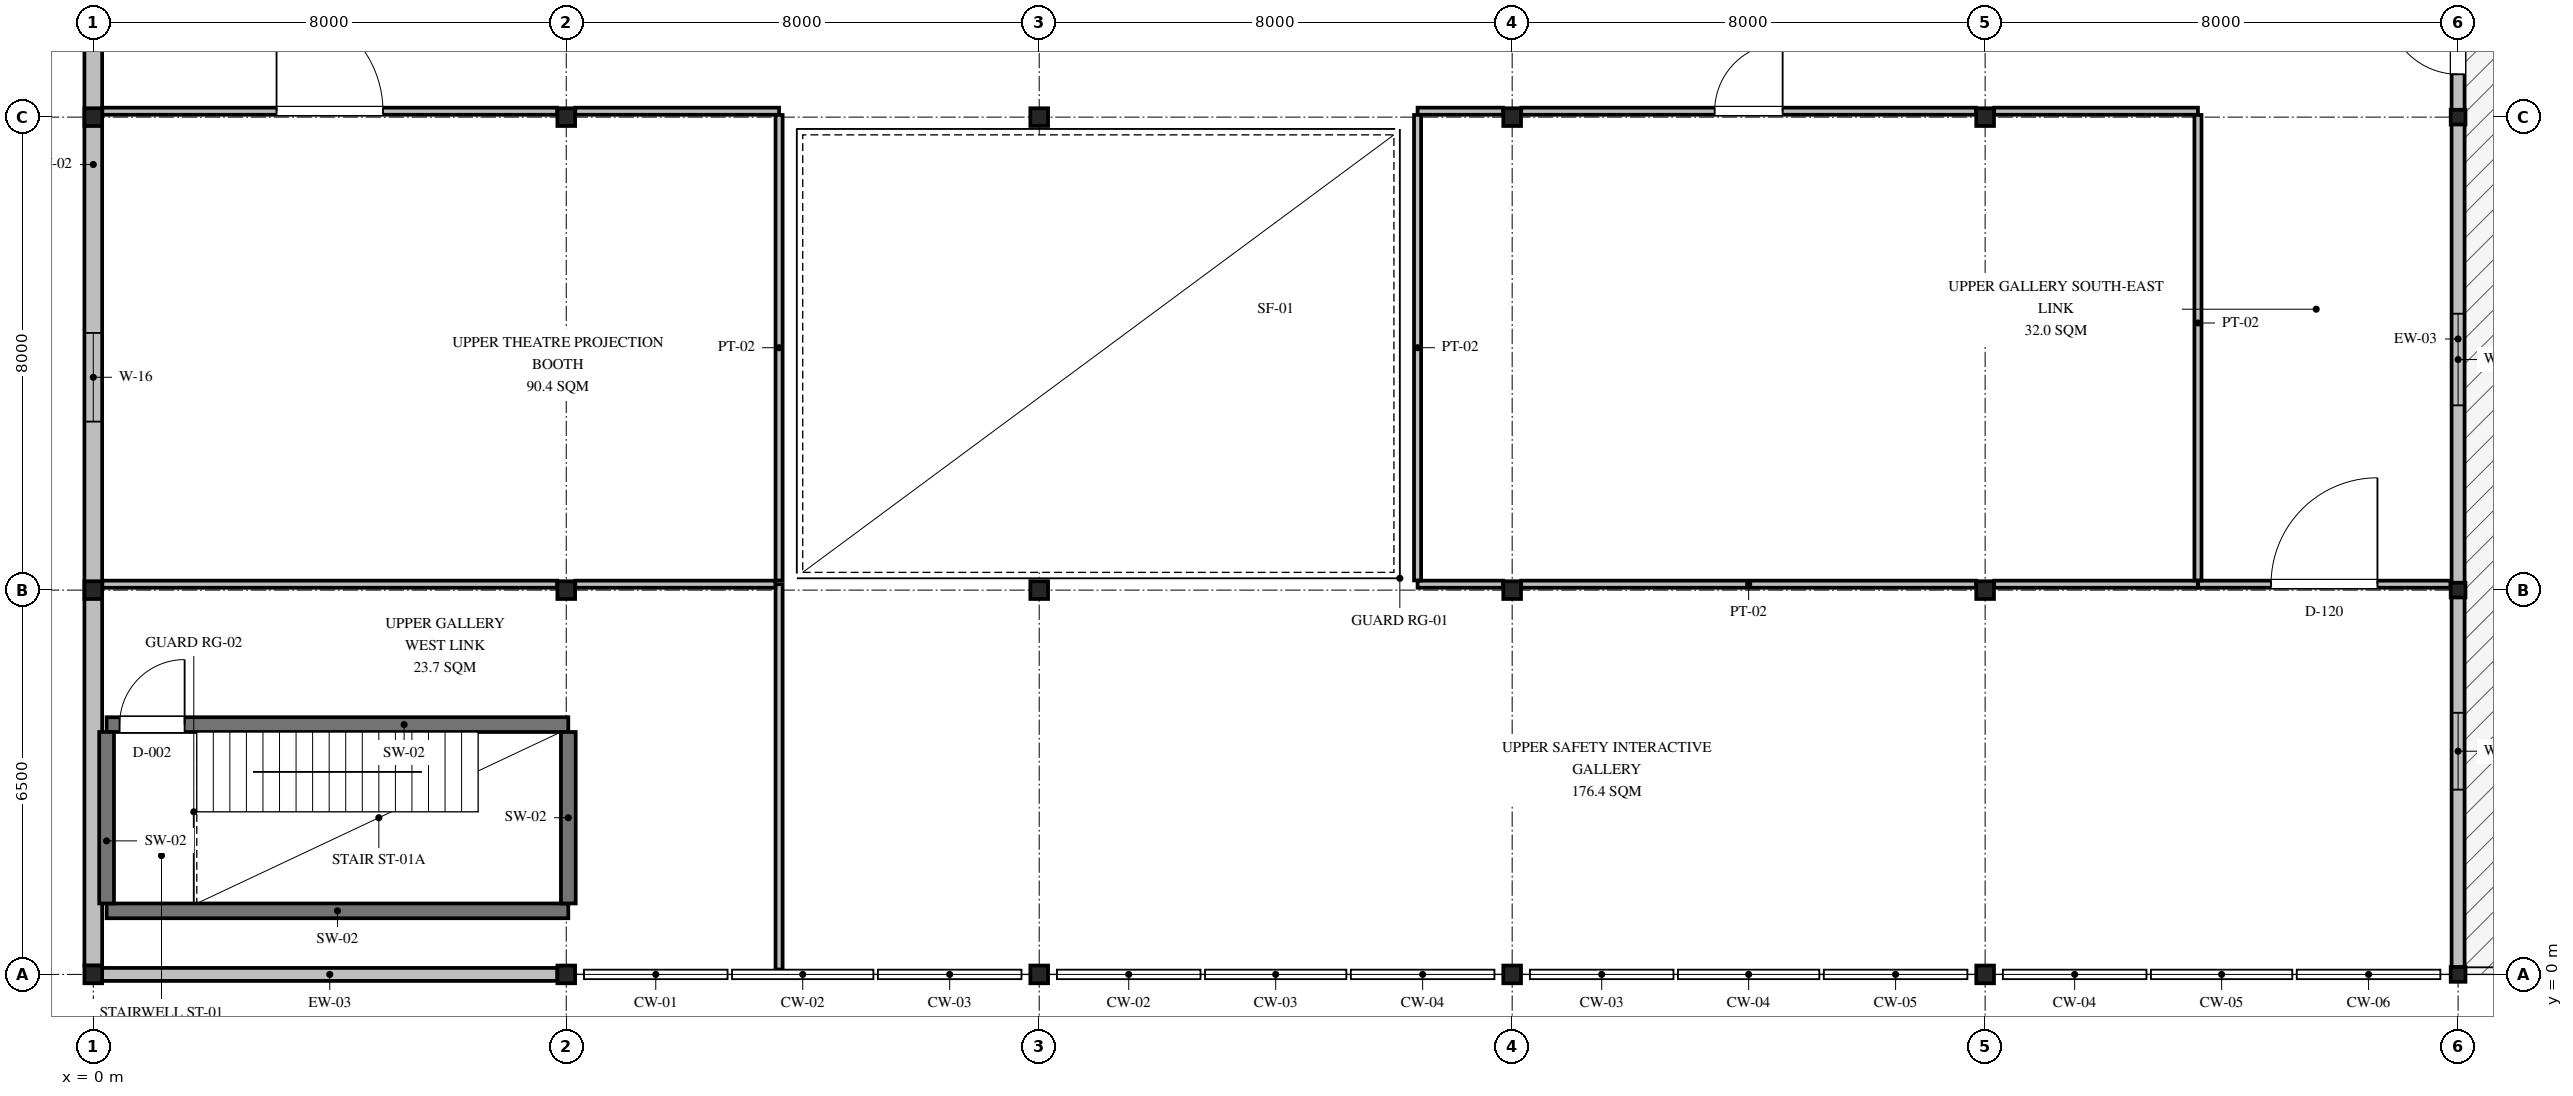
"""IFC4 building model, lengths in metres.
Left out: names, types, materials, properties, quantities, classifications, styles, units other than length and angle.
Written with IfcOpenShell. Run it as: python <this file> out.ifc"""

import sys

from ifc_helpers import new_model, si_unit, direction, frame, frame_2d, origin, origin_2d, place, context, subcontext, project, spatial, rectangle, hollow_rectangle, i_section, extrude, element, fill, save


model = new_model("IFC4")
c1 = context("Model", 3, precision=1e-05, world=origin(), true_north=direction((0.0, 1.0)))
c2 = subcontext(c1, "Body", "Model", "MODEL_VIEW")
j1 = project(units=[si_unit("LENGTHUNIT", "METRE"), si_unit("PLANEANGLEUNIT", "RADIAN")], contexts=[c1])
p1 = place(None, origin())
s1 = spatial("IfcSite", under=j1, at=p1, CompositionType="ELEMENT")
p2 = place(p1, origin())
s2 = spatial("IfcBuilding", under=s1, at=p2, CompositionType="ELEMENT")
p3 = place(p2, frame((0.0, 0.0, 5.85)))
s3 = spatial("IfcBuildingStorey", under=s2, at=p3, CompositionType="ELEMENT", Elevation=5.85)
for number, where, z_axis, x_axis in (
    (1, (0.0, 0.0, 0.0), (0.0, 0.0, 1.0), (1.0, 0.0, 0.0)),
    (2, (0.0, 6.5, 0.0), (0.0, 0.0, 1.0), (1.0, 0.0, 0.0)),
    (3, (0.0, 14.5, 0.0), (0.0, 0.0, 1.0), (1.0, 0.0, 0.0)),
    (4, (8.0, 0.0, 0.0), (0.0, 0.0, 1.0), (1.0, 0.0, 0.0)),
    (5, (8.0, 6.5, 0.0), (0.0, 0.0, 1.0), (1.0, 0.0, 0.0)),
    (6, (8.0, 14.5, 0.0), (0.0, 0.0, 1.0), (1.0, 0.0, 0.0)),
    (7, (16.0, 0.0, 0.0), (0.0, 0.0, 1.0), (1.0, 0.0, 0.0)),
    (8, (16.0, 6.5, 0.0), (0.0, 0.0, 1.0), (1.0, 0.0, 0.0)),
    (9, (16.0, 14.5, 0.0), (0.0, 0.0, 1.0), (1.0, 0.0, 0.0)),
    (10, (24.0, 0.0, 0.0), (0.0, 0.0, 1.0), (1.0, 0.0, 0.0)),
    (11, (24.0, 6.5, 0.0), (0.0, 0.0, 1.0), (1.0, 0.0, 0.0)),
    (12, (24.0, 14.5, 0.0), (0.0, 0.0, 1.0), (1.0, 0.0, 0.0)),
    (13, (32.0, 0.0, 0.0), (0.0, 0.0, 1.0), (1.0, 0.0, 0.0)),
    (14, (32.0, 6.5, 0.0), (0.0, 0.0, 1.0), (1.0, 0.0, 0.0)),
    (15, (32.0, 14.5, 0.0), (0.0, 0.0, 1.0), (1.0, 0.0, 0.0)),
):
    element("IfcColumn", number, at=place(p3, frame(where, z_axis=z_axis, x_axis=x_axis)), inside=s3, PredefinedType="COLUMN", context=c2, shape_type="SweptSolid", body=[
        extrude(i_section(OverallWidth=0.3, OverallDepth=0.3, WebThickness=0.01, FlangeThickness=0.015, FilletRadius=0.018, at=origin_2d()), origin(), (0.0, 0.0, 1.0), 4.2),
    ])
for number, where, z_axis, x_axis in (
    (16, (40.0, 0.0, 0.0), (0.0, 0.0, 1.0), (1.0, 0.0, 0.0)),
    (17, (40.0, 6.5, 0.0), (0.0, 0.0, 1.0), (1.0, 0.0, 0.0)),
    (18, (40.0, 14.5, 0.0), (0.0, 0.0, 1.0), (1.0, 0.0, 0.0)),
):
    element("IfcColumn", number, at=place(p3, frame(where, z_axis=z_axis, x_axis=x_axis)), inside=s3, PredefinedType="COLUMN", context=c2, shape_type="SweptSolid", body=[
        extrude(hollow_rectangle(XDim=0.25, YDim=0.25, WallThickness=0.012, at=origin_2d()), origin(), (0.0, 0.0, 1.0), 4.2),
    ])
p4 = place(p3, frame((0.0, 0.15, 0.0), z_axis=(0.0, 0.0, 1.0), x_axis=(0.0, 1.0, 0.0)))
e19 = element("IfcWall", 19, at=p4, inside=s3, PredefinedType="SOLIDWALL", context=c2, shape_type="SweptSolid", body=[
    extrude(rectangle(XDim=22.2, YDim=0.3, at=frame_2d((11.1, 0.0))), origin(), (0.0, 0.0, 1.0), 3.344),
])
p5 = place(p4, frame((9.2, 0.0, 1.05)))
e20 = element("IfcOpeningElement", 20, at=p5, cuts=e19, PredefinedType="OPENING", context=c2, shape_type="SweptSolid", body=[
    extrude(rectangle(XDim=1.5, YDim=1.5, at=frame_2d((0.75, 0.75))), frame((0.0, 0.16, 0.0), z_axis=(0.0, -1.0, 0.0), x_axis=(1.0, 0.0, 0.0)), (0.0, 0.0, 1.0), 0.32),
])
p6 = place(p4, frame((16.0, 0.0, 1.05)))
e21 = element("IfcOpeningElement", 21, at=p6, cuts=e19, PredefinedType="OPENING", context=c2, shape_type="SweptSolid", body=[
    extrude(rectangle(XDim=1.65, YDim=1.5, at=frame_2d((0.825, 0.75))), frame((0.0, 0.16, 0.0), z_axis=(0.0, -1.0, 0.0), x_axis=(1.0, 0.0, 0.0)), (0.0, 0.0, 1.0), 0.32),
])
p7 = place(p4, frame((19.2, 0.0, 1.05)))
e22 = element("IfcOpeningElement", 22, at=p7, cuts=e19, PredefinedType="OPENING", context=c2, shape_type="SweptSolid", body=[
    extrude(rectangle(XDim=1.8, YDim=1.5, at=frame_2d((0.9, 0.75))), frame((0.0, 0.16, 0.0), z_axis=(0.0, -1.0, 0.0), x_axis=(1.0, 0.0, 0.0)), (0.0, 0.0, 1.0), 0.32),
])
p8 = place(p3, frame((0.15, 0.0, 0.0), z_axis=(0.0, 0.0, 1.0), x_axis=(1.0, 0.0, 0.0)))
e23 = element("IfcWall", 23, at=p8, inside=s3, PredefinedType="SOLIDWALL", context=c2, shape_type="SweptSolid", body=[
    extrude(rectangle(XDim=7.7, YDim=0.22, at=frame_2d((3.85, 0.0))), origin(), (0.0, 0.0, 1.0), 3.344),
])
p9 = place(p3, frame((40.0, 0.125, 0.0), z_axis=(0.0, 0.0, 1.0), x_axis=(0.0, 1.0, 0.0)))
e24 = element("IfcWall", 24, at=p9, inside=s3, PredefinedType="SOLIDWALL", context=c2, shape_type="SweptSolid", body=[
    extrude(rectangle(XDim=22.25, YDim=0.22, at=frame_2d((11.125, 0.0))), origin(), (0.0, 0.0, 1.0), 3.554),
])
p10 = place(p9, frame((15.1, 0.0, 0.0)))
e25 = element("IfcOpeningElement", 25, at=p10, cuts=e24, PredefinedType="OPENING", context=c2, shape_type="SweptSolid", body=[
    extrude(rectangle(XDim=1.2, YDim=2.2, at=frame_2d((0.6, 1.1))), frame((0.0, 0.12, 0.0), z_axis=(0.0, -1.0, 0.0), x_axis=(1.0, 0.0, 0.0)), (0.0, 0.0, 1.0), 0.24),
])
p11 = place(p9, frame((3.0, 0.0, 1.0)))
e26 = element("IfcOpeningElement", 26, at=p11, cuts=e24, PredefinedType="OPENING", context=c2, shape_type="SweptSolid", body=[
    extrude(rectangle(XDim=1.3, YDim=1.3, at=frame_2d((0.65, 0.65))), frame((0.0, 0.12, 0.0), z_axis=(0.0, -1.0, 0.0), x_axis=(1.0, 0.0, 0.0)), (0.0, 0.0, 1.0), 0.24),
])
p12 = place(p9, frame((9.5, 0.0, 1.0)))
e27 = element("IfcOpeningElement", 27, at=p12, cuts=e24, PredefinedType="OPENING", context=c2, shape_type="SweptSolid", body=[
    extrude(rectangle(XDim=1.55, YDim=1.3, at=frame_2d((0.775, 0.65))), frame((0.0, 0.12, 0.0), z_axis=(0.0, -1.0, 0.0), x_axis=(1.0, 0.0, 0.0)), (0.0, 0.0, 1.0), 0.24),
])
p13 = place(p3, frame((0.225, 1.075, 0.0), z_axis=(0.0, 0.0, 1.0), x_axis=(1.0, 0.0, 0.0)))
e28 = element("IfcWall", 28, at=p13, inside=s3, PredefinedType="SHEAR", context=c2, shape_type="SweptSolid", body=[
    extrude(rectangle(XDim=7.81, YDim=0.25, at=frame_2d((3.905, 0.0))), origin(), (0.0, 0.0, 1.0), 4.0),
])
p14 = place(p3, frame((0.225, 4.225, 0.0), z_axis=(0.0, 0.0, 1.0), x_axis=(1.0, 0.0, 0.0)))
e29 = element("IfcWall", 29, at=p14, inside=s3, PredefinedType="SHEAR", context=c2, shape_type="SweptSolid", body=[
    extrude(rectangle(XDim=7.81, YDim=0.25, at=frame_2d((3.905, 0.0))), origin(), (0.0, 0.0, 1.0), 4.0),
])
p15 = place(p14, frame((0.22, 0.0, 0.0)))
e30 = element("IfcOpeningElement", 30, at=p15, cuts=e29, PredefinedType="OPENING", context=c2, shape_type="SweptSolid", body=[
    extrude(rectangle(XDim=1.1, YDim=2.15, at=frame_2d((0.55, 1.075))), frame((0.0, 0.135, 0.0), z_axis=(0.0, -1.0, 0.0), x_axis=(1.0, 0.0, 0.0)), (0.0, 0.0, 1.0), 0.27),
])
for number, where, z_axis, x_axis in (
    (31, (0.225, 1.2, 0.0), (0.0, 0.0, 1.0), (0.0, 1.0, 0.0)),
    (32, (8.035, 1.2, 0.0), (0.0, 0.0, 1.0), (0.0, 1.0, 0.0)),
):
    element("IfcWall", number, at=place(p3, frame(where, z_axis=z_axis, x_axis=x_axis)), inside=s3, PredefinedType="SHEAR", context=c2, shape_type="SweptSolid", body=[
        extrude(rectangle(XDim=2.9, YDim=0.25, at=frame_2d((1.45, 0.0))), origin(), (0.0, 0.0, 1.0), 4.0),
    ])
p16 = place(p3, frame((11.6, 0.083, 0.0), z_axis=(0.0, 0.0, 1.0), x_axis=(0.0, 1.0, 0.0)))
e33 = element("IfcWall", 33, at=p16, inside=s3, PredefinedType="PARTITIONING", context=c2, shape_type="SweptSolid", body=[
    extrude(rectangle(XDim=6.517, YDim=0.12, at=frame_2d((3.259, 0.0))), origin(), (0.0, 0.0, 1.0), 4.0),
])
p17 = place(p3, frame((35.6, 6.6, 0.0), z_axis=(0.0, 0.0, 1.0), x_axis=(1.0, 0.0, 0.0)))
e34 = element("IfcWall", 34, at=p17, inside=s3, PredefinedType="PARTITIONING", context=c2, shape_type="SweptSolid", body=[
    extrude(rectangle(XDim=4.272, YDim=0.12, at=frame_2d((2.136, 0.0))), origin(), (0.0, 0.0, 1.0), 3.094),
])
p18 = place(p17, frame((1.236, 0.0, 0.0)))
e35 = element("IfcOpeningElement", 35, at=p18, cuts=e34, PredefinedType="OPENING", context=c2, shape_type="SweptSolid", body=[
    extrude(rectangle(XDim=1.8, YDim=2.3, at=frame_2d((0.9, 1.15))), frame((0.0, 0.07, 0.0), z_axis=(0.0, -1.0, 0.0), x_axis=(1.0, 0.0, 0.0)), (0.0, 0.0, 1.0), 0.14),
])
p19 = place(p3, frame((0.153, 6.6, 0.0), z_axis=(0.0, 0.0, 1.0), x_axis=(1.0, 0.0, 0.0)))
e36 = element("IfcWall", 36, at=p19, inside=s3, PredefinedType="PARTITIONING", context=c2, shape_type="SweptSolid", body=[
    extrude(rectangle(XDim=7.694, YDim=0.12, at=frame_2d((3.847, 0.0))), origin(), (0.0, 0.0, 1.0), 3.654),
])
p20 = place(p3, frame((8.153, 6.6, 0.0), z_axis=(0.0, 0.0, 1.0), x_axis=(1.0, 0.0, 0.0)))
e37 = element("IfcWall", 37, at=p20, inside=s3, PredefinedType="PARTITIONING", context=c2, shape_type="SweptSolid", body=[
    extrude(rectangle(XDim=3.384, YDim=0.12, at=frame_2d((1.692, 0.0))), origin(), (0.0, 0.0, 1.0), 3.294),
])
p21 = place(p3, frame((0.153, 14.6, 0.0), z_axis=(0.0, 0.0, 1.0), x_axis=(1.0, 0.0, 0.0)))
e38 = element("IfcWall", 38, at=p21, inside=s3, PredefinedType="PARTITIONING", context=c2, shape_type="SweptSolid", body=[
    extrude(rectangle(XDim=7.694, YDim=0.12, at=frame_2d((3.847, 0.0))), origin(), (0.0, 0.0, 1.0), 3.406),
])
p22 = place(p21, frame((2.947, 0.0, 0.0)))
e39 = element("IfcOpeningElement", 39, at=p22, cuts=e38, PredefinedType="OPENING", context=c2, shape_type="SweptSolid", body=[
    extrude(rectangle(XDim=1.8, YDim=2.3, at=frame_2d((0.9, 1.15))), frame((0.0, 0.07, 0.0), z_axis=(0.0, -1.0, 0.0), x_axis=(1.0, 0.0, 0.0)), (0.0, 0.0, 1.0), 0.14),
])
p23 = place(p3, frame((8.153, 14.6, 0.0), z_axis=(0.0, 0.0, 1.0), x_axis=(1.0, 0.0, 0.0)))
e40 = element("IfcWall", 40, at=p23, inside=s3, PredefinedType="PARTITIONING", context=c2, shape_type="SweptSolid", body=[
    extrude(rectangle(XDim=3.447, YDim=0.12, at=frame_2d((1.724, 0.0))), origin(), (0.0, 0.0, 1.0), 3.194),
])
p24 = place(p3, frame((11.6, 6.663, 0.0), z_axis=(0.0, 0.0, 1.0), x_axis=(0.0, 1.0, 0.0)))
e41 = element("IfcWall", 41, at=p24, inside=s3, PredefinedType="PARTITIONING", context=c2, shape_type="SweptSolid", body=[
    extrude(rectangle(XDim=7.874, YDim=0.12, at=frame_2d((3.937, 0.0))), origin(), (0.0, 0.0, 1.0), 4.0),
])
p25 = place(p3, frame((22.4, 6.6, 0.0), z_axis=(0.0, 0.0, 1.0), x_axis=(1.0, 0.0, 0.0)))
e42 = element("IfcWall", 42, at=p25, inside=s3, PredefinedType="PARTITIONING", context=c2, shape_type="SweptSolid", body=[
    extrude(rectangle(XDim=1.447, YDim=0.12, at=frame_2d((0.724, 0.0))), origin(), (0.0, 0.0, 1.0), 3.494),
])
p26 = place(p3, frame((24.153, 6.6, 0.0), z_axis=(0.0, 0.0, 1.0), x_axis=(1.0, 0.0, 0.0)))
e43 = element("IfcWall", 43, at=p26, inside=s3, PredefinedType="PARTITIONING", context=c2, shape_type="SweptSolid", body=[
    extrude(rectangle(XDim=7.694, YDim=0.12, at=frame_2d((3.847, 0.0))), origin(), (0.0, 0.0, 1.0), 3.194),
])
p27 = place(p3, frame((32.153, 6.6, 0.0), z_axis=(0.0, 0.0, 1.0), x_axis=(1.0, 0.0, 0.0)))
e44 = element("IfcWall", 44, at=p27, inside=s3, PredefinedType="PARTITIONING", context=c2, shape_type="SweptSolid", body=[
    extrude(rectangle(XDim=3.444, YDim=0.12, at=frame_2d((1.722, 0.0))), origin(), (0.0, 0.0, 1.0), 3.094),
])
p28 = place(p3, frame((22.4, 14.6, 0.0), z_axis=(0.0, 0.0, 1.0), x_axis=(1.0, 0.0, 0.0)))
e45 = element("IfcWall", 45, at=p28, inside=s3, PredefinedType="PARTITIONING", context=c2, shape_type="SweptSolid", body=[
    extrude(rectangle(XDim=1.447, YDim=0.12, at=frame_2d((0.724, 0.0))), origin(), (0.0, 0.0, 1.0), 3.094),
])
p29 = place(p3, frame((24.153, 14.6, 0.0), z_axis=(0.0, 0.0, 1.0), x_axis=(1.0, 0.0, 0.0)))
e46 = element("IfcWall", 46, at=p29, inside=s3, PredefinedType="PARTITIONING", context=c2, shape_type="SweptSolid", body=[
    extrude(rectangle(XDim=7.694, YDim=0.12, at=frame_2d((3.847, 0.0))), origin(), (0.0, 0.0, 1.0), 2.894),
])
p30 = place(p29, frame((3.272, 0.0, 0.0)))
e47 = element("IfcOpeningElement", 47, at=p30, cuts=e46, PredefinedType="OPENING", context=c2, shape_type="SweptSolid", body=[
    extrude(rectangle(XDim=1.15, YDim=2.1, at=frame_2d((0.575, 1.05))), frame((0.0, 0.07, 0.0), z_axis=(0.0, -1.0, 0.0), x_axis=(1.0, 0.0, 0.0)), (0.0, 0.0, 1.0), 0.14),
])
p31 = place(p3, frame((32.153, 14.6, 0.0), z_axis=(0.0, 0.0, 1.0), x_axis=(1.0, 0.0, 0.0)))
e48 = element("IfcWall", 48, at=p31, inside=s3, PredefinedType="PARTITIONING", context=c2, shape_type="SweptSolid", body=[
    extrude(rectangle(XDim=3.447, YDim=0.12, at=frame_2d((1.724, 0.0))), origin(), (0.0, 0.0, 1.0), 3.344),
])
for number, where, z_axis, x_axis in (
    (49, (22.4, 6.663, 0.0), (0.0, 0.0, 1.0), (0.0, 1.0, 0.0)),
    (50, (35.6, 6.663, 0.0), (0.0, 0.0, 1.0), (0.0, 1.0, 0.0)),
):
    element("IfcWall", number, at=place(p3, frame(where, z_axis=z_axis, x_axis=x_axis)), inside=s3, PredefinedType="PARTITIONING", context=c2, shape_type="SweptSolid", body=[
        extrude(rectangle(XDim=7.874, YDim=0.12, at=frame_2d((3.937, 0.0))), origin(), (0.0, 0.0, 1.0), 4.0),
    ])
p32 = place(p5, origin())
e51 = element("IfcWindow", 51, at=p32, inside=s3, PartitioningType="SINGLE_PANEL", PredefinedType="WINDOW", context=c2, shape_type="SweptSolid", body=[
    extrude(rectangle(XDim=1.5, YDim=1.5, at=frame_2d((0.75, 0.75))), frame((0.0, 0.03, 0.0), z_axis=(0.0, -1.0, 0.0), x_axis=(1.0, 0.0, 0.0)), (0.0, 0.0, 1.0), 0.06),
])
fill(e20, e51)
p33 = place(p10, frame((1.2, 0.0, 0.0), z_axis=(0.0, 0.0, 1.0), x_axis=(-1.0, 0.0, 0.0)))
e52 = element("IfcDoor", 52, at=p33, inside=s3, OperationType="SINGLE_SWING_RIGHT", PredefinedType="DOOR", context=c2, shape_type="SweptSolid", body=[
    extrude(rectangle(XDim=1.2, YDim=2.2, at=frame_2d((0.6, 1.1))), frame((0.0, 0.025, 0.0), z_axis=(0.0, -1.0, 0.0), x_axis=(1.0, 0.0, 0.0)), (0.0, 0.0, 1.0), 0.05),
])
fill(e25, e52)
p34 = place(p11, origin())
e53 = element("IfcWindow", 53, at=p34, inside=s3, PartitioningType="SINGLE_PANEL", PredefinedType="WINDOW", context=c2, shape_type="SweptSolid", body=[
    extrude(rectangle(XDim=1.3, YDim=1.3, at=frame_2d((0.65, 0.65))), frame((0.0, 0.03, 0.0), z_axis=(0.0, -1.0, 0.0), x_axis=(1.0, 0.0, 0.0)), (0.0, 0.0, 1.0), 0.06),
])
fill(e26, e53)
p35 = place(p12, origin())
e54 = element("IfcWindow", 54, at=p35, inside=s3, PartitioningType="SINGLE_PANEL", PredefinedType="WINDOW", context=c2, shape_type="SweptSolid", body=[
    extrude(rectangle(XDim=1.55, YDim=1.3, at=frame_2d((0.775, 0.65))), frame((0.0, 0.03, 0.0), z_axis=(0.0, -1.0, 0.0), x_axis=(1.0, 0.0, 0.0)), (0.0, 0.0, 1.0), 0.06),
])
fill(e27, e54)
p36 = place(p15, origin())
e55 = element("IfcDoor", 55, at=p36, inside=s3, OperationType="SINGLE_SWING_RIGHT", PredefinedType="DOOR", context=c2, shape_type="SweptSolid", body=[
    extrude(rectangle(XDim=1.1, YDim=2.15, at=frame_2d((0.55, 1.075))), frame((0.0, 0.025, 0.0), z_axis=(0.0, -1.0, 0.0), x_axis=(1.0, 0.0, 0.0)), (0.0, 0.0, 1.0), 0.05),
])
fill(e30, e55)
p37 = place(p18, origin())
e56 = element("IfcDoor", 56, at=p37, inside=s3, OperationType="SINGLE_SWING_RIGHT", PredefinedType="DOOR", context=c2, shape_type="SweptSolid", body=[
    extrude(rectangle(XDim=1.8, YDim=2.3, at=frame_2d((0.9, 1.15))), frame((0.0, 0.025, 0.0), z_axis=(0.0, -1.0, 0.0), x_axis=(1.0, 0.0, 0.0)), (0.0, 0.0, 1.0), 0.05),
])
fill(e35, e56)
p38 = place(p22, origin())
e57 = element("IfcDoor", 57, at=p38, inside=s3, OperationType="SINGLE_SWING_LEFT", PredefinedType="DOOR", context=c2, shape_type="SweptSolid", body=[
    extrude(rectangle(XDim=1.8, YDim=2.3, at=frame_2d((0.9, 1.15))), frame((0.0, 0.025, 0.0), z_axis=(0.0, -1.0, 0.0), x_axis=(1.0, 0.0, 0.0)), (0.0, 0.0, 1.0), 0.05),
])
fill(e39, e57)
p39 = place(p30, origin())
e58 = element("IfcDoor", 58, at=p39, inside=s3, OperationType="SINGLE_SWING_RIGHT", PredefinedType="DOOR", context=c2, shape_type="SweptSolid", body=[
    extrude(rectangle(XDim=1.15, YDim=2.1, at=frame_2d((0.575, 1.05))), frame((0.0, 0.025, 0.0), z_axis=(0.0, -1.0, 0.0), x_axis=(1.0, 0.0, 0.0)), (0.0, 0.0, 1.0), 0.05),
])
fill(e47, e58)
save(model, sys.argv[1])
